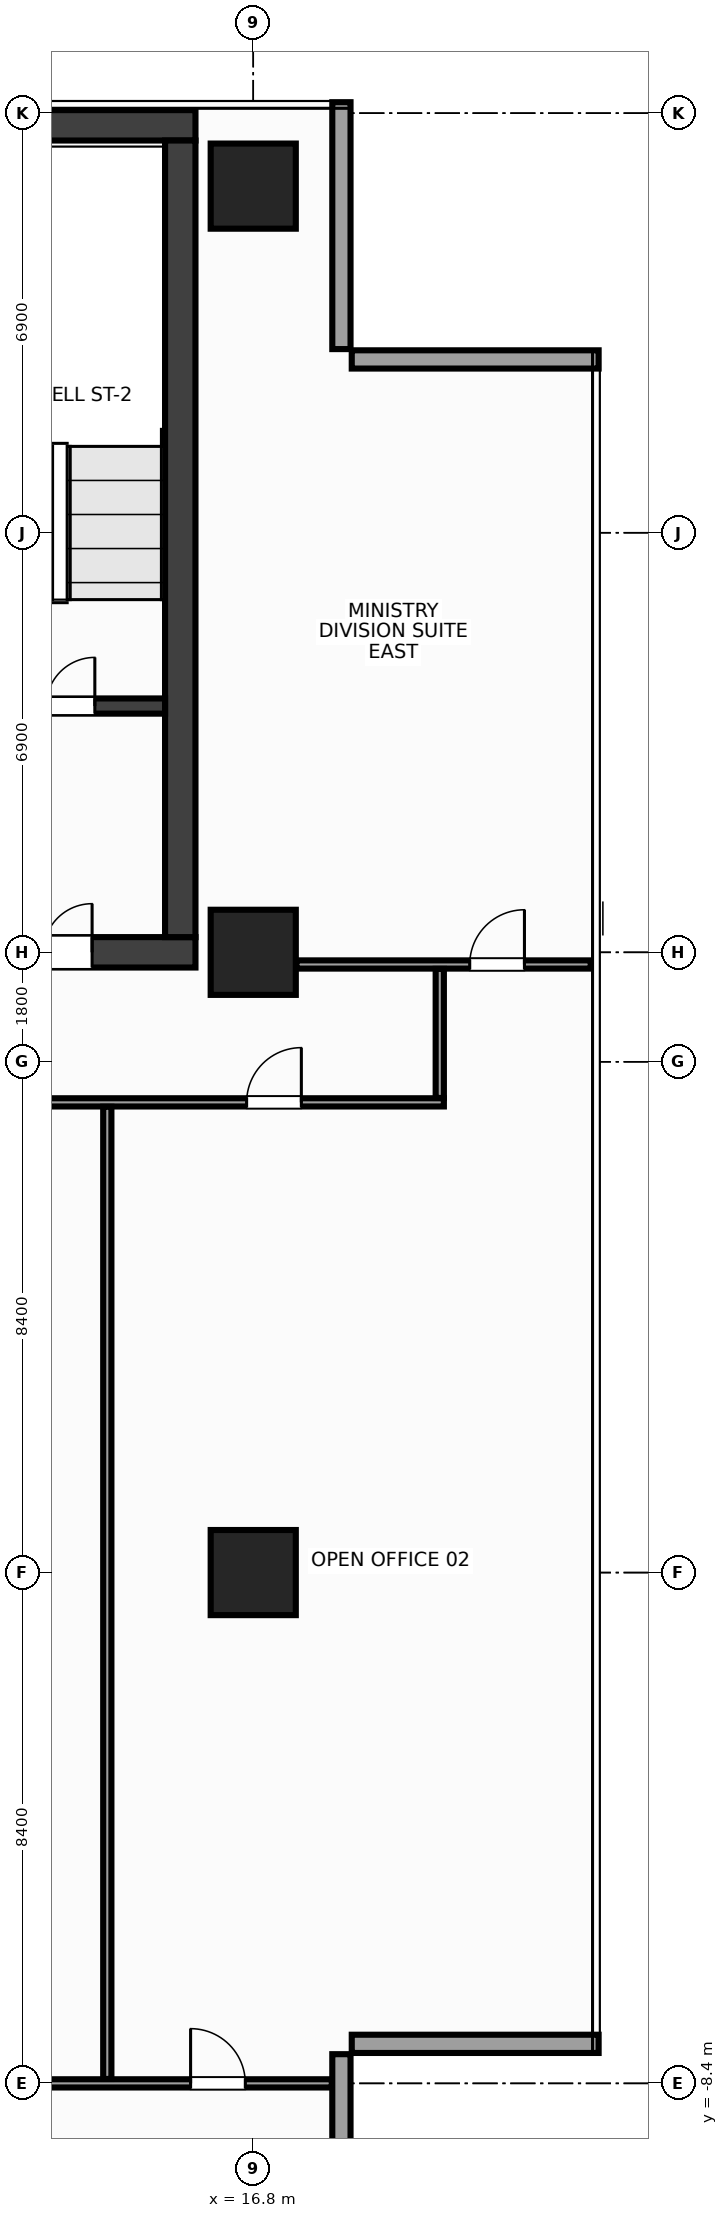
"""IFC4 building model, lengths in metres.
Left out: names, types, materials, properties, quantities, classifications, styles, units other than length and angle.
Written with IfcOpenShell. Run it as: python <this file> out.ifc"""

import sys

from ifc_helpers import new_model, si_unit, direction, frame, frame_2d, origin, origin_2d, place, context, subcontext, project, spatial, rectangle, extrude, source, transform, mapped, element, fill, save


model = new_model("IFC4")
c1 = context("Model", 3, precision=1e-05, world=origin(), true_north=direction((0.0, 1.0)))
c2 = subcontext(c1, "Body", "Model", "MODEL_VIEW")
j1 = project(units=[si_unit("LENGTHUNIT", "METRE"), si_unit("PLANEANGLEUNIT", "RADIAN")], contexts=[c1])
p1 = place(None, origin())
s1 = spatial("IfcSite", under=j1, at=p1, CompositionType="ELEMENT")
p2 = place(p1, origin())
s2 = spatial("IfcBuilding", under=s1, at=p2, CompositionType="ELEMENT")
p3 = place(p2, frame((0.0, 0.0, 232.4)))
s3 = spatial("IfcBuildingStorey", under=s2, at=p3, CompositionType="ELEMENT", Elevation=232.4)
m1 = source(origin(), c2, "Body", "SweptSolid", [
    extrude(rectangle(XDim=31.7, YDim=0.5, at=frame_2d((15.85, 0.0))), origin(), (0.0, 0.0, 1.0), 3.6),
])
p4 = place(p3, frame((-15.85, 23.8, 0.0), z_axis=(0.0, 0.0, 1.0), x_axis=(1.0, 0.0, 0.0)))
e1 = element("IfcWall", 1, at=p4, inside=s3, PredefinedType="SHEAR", context=c2, shape_type="MappedRepresentation", body=[
    mapped(m1, transform((0.0, 0.0, 0.0), x_axis=(1.0, 0.0, 0.0), y_axis=(0.0, 1.0, 0.0), z_axis=(0.0, 0.0, 1.0), scale=1.0)),
])
p5 = place(p3, frame((-15.85, 10.2, 0.0), z_axis=(0.0, 0.0, 1.0), x_axis=(1.0, 0.0, 0.0)))
e2 = element("IfcWall", 2, at=p5, inside=s3, PredefinedType="SHEAR", context=c2, shape_type="MappedRepresentation", body=[
    mapped(m1, transform((0.0, 0.0, 0.0), x_axis=(1.0, 0.0, 0.0), y_axis=(0.0, 1.0, 0.0), z_axis=(0.0, 0.0, 1.0), scale=1.0)),
])
p6 = place(p5, frame((1.7, 0.0, 0.0)))
e3 = element("IfcOpeningElement", 3, at=p6, cuts=e2, PredefinedType="OPENING", context=c2, shape_type="SweptSolid", body=[
    extrude(rectangle(XDim=1.6, YDim=2.15, at=frame_2d((0.8, 1.075))), frame((0.0, 0.262, 0.0), z_axis=(0.0, -1.0, 0.0), x_axis=(1.0, 0.0, 0.0)), (0.0, 0.0, 1.0), 0.524),
])
p7 = place(p5, frame((28.4, 0.0, 0.0)))
e4 = element("IfcOpeningElement", 4, at=p7, cuts=e2, PredefinedType="OPENING", context=c2, shape_type="SweptSolid", body=[
    extrude(rectangle(XDim=1.6, YDim=2.15, at=frame_2d((0.8, 1.075))), frame((0.0, 0.262, 0.0), z_axis=(0.0, -1.0, 0.0), x_axis=(1.0, 0.0, 0.0)), (0.0, 0.0, 1.0), 0.524),
])
p8 = place(p5, frame((15.1, 0.0, 0.0)))
e5 = element("IfcOpeningElement", 5, at=p8, cuts=e2, PredefinedType="OPENING", context=c2, shape_type="SweptSolid", body=[
    extrude(rectangle(XDim=1.5, YDim=2.2, at=frame_2d((0.75, 1.1))), frame((0.0, 0.262, 0.0), z_axis=(0.0, -1.0, 0.0), x_axis=(1.0, 0.0, 0.0)), (0.0, 0.0, 1.0), 0.524),
])
m2 = source(origin(), c2, "Body", "SweptSolid", [
    extrude(rectangle(XDim=13.1, YDim=0.5, at=frame_2d((6.55, 0.0))), origin(), (0.0, 0.0, 1.0), 3.6),
])
p9 = place(p3, frame((15.6, 10.45, 0.0), z_axis=(0.0, 0.0, 1.0), x_axis=(0.0, 1.0, 0.0)))
e6 = element("IfcWall", 6, at=p9, inside=s3, PredefinedType="SHEAR", context=c2, shape_type="MappedRepresentation", body=[
    mapped(m2, transform((0.0, 0.0, 0.0), x_axis=(1.0, 0.0, 0.0), y_axis=(0.0, 1.0, 0.0), z_axis=(0.0, 0.0, 1.0), scale=1.0)),
])
m3 = source(origin(), c2, "Body", "SweptSolid", [
    extrude(rectangle(XDim=3.705, YDim=0.25, at=frame_2d((1.853, 0.0))), origin(), (0.0, 0.0, 1.0), 3.6),
])
p10 = place(p3, frame((11.645, 14.25, 0.0), z_axis=(0.0, 0.0, 1.0), x_axis=(1.0, 0.0, 0.0)))
e7 = element("IfcWall", 7, at=p10, inside=s3, PredefinedType="SHEAR", context=c2, shape_type="MappedRepresentation", body=[
    mapped(m3, transform((0.0, 0.0, 0.0), x_axis=(1.0, 0.0, 0.0), y_axis=(0.0, 1.0, 0.0), z_axis=(0.0, 0.0, 1.0), scale=1.0)),
])
p11 = place(p10, frame((0.95, 0.0, 0.0)))
e8 = element("IfcOpeningElement", 8, at=p11, cuts=e7, PredefinedType="OPENING", context=c2, shape_type="SweptSolid", body=[
    extrude(rectangle(XDim=1.6, YDim=2.15, at=frame_2d((0.8, 1.075))), frame((0.0, 0.137, 0.0), z_axis=(0.0, -1.0, 0.0), x_axis=(1.0, 0.0, 0.0)), (0.0, 0.0, 1.0), 0.274),
])
m4 = source(origin(), c2, "Body", "SweptSolid", [
    extrude(rectangle(XDim=1.4, YDim=1.4, at=origin_2d()), origin(), (0.0, 0.0, 1.0), 3.6),
])
for number, where, z_axis, x_axis in (
    (9, (16.8, 0.0, 0.0), (0.0, 0.0, 1.0), (1.0, 0.0, 0.0)),
    (10, (16.8, 10.2, 0.0), (0.0, 0.0, 1.0), (1.0, 0.0, 0.0)),
    (11, (16.8, 22.8, 0.0), (0.0, 0.0, 1.0), (1.0, 0.0, 0.0)),
):
    element("IfcColumn", number, at=place(p3, frame(where, z_axis=z_axis, x_axis=x_axis)), inside=s3, PredefinedType="COLUMN", context=c2, shape_type="MappedRepresentation", body=[
        mapped(m4, transform((0.0, 0.0, 0.0), x_axis=(1.0, 0.0, 0.0), y_axis=(0.0, 1.0, 0.0), z_axis=(0.0, 0.0, 1.0), scale=1.0)),
    ])
m5 = source(origin(), c2, "Body", "SweptSolid", [
    extrude(rectangle(XDim=4.06, YDim=0.3, at=frame_2d((2.03, 0.0))), origin(), (0.0, 0.0, 1.0), 2.75),
])
for number, where, z_axis, x_axis in (
    (12, (18.25, -11.98, 0.0), (0.0, 0.0, 1.0), (0.0, 1.0, 0.0)),
    (13, (18.42, -7.75, 0.0), (0.0, 0.0, 1.0), (1.0, 0.0, 0.0)),
    (14, (22.48, 19.95, 0.0), (0.0, 0.0, 1.0), (-1.0, 0.0, 0.0)),
):
    element("IfcWall", number, at=place(p3, frame(where, z_axis=z_axis, x_axis=x_axis)), inside=s3, PredefinedType="STANDARD", context=c2, shape_type="MappedRepresentation", body=[
        mapped(m5, transform((0.0, 0.0, 0.0), x_axis=(1.0, 0.0, 0.0), y_axis=(0.0, 1.0, 0.0), z_axis=(0.0, 0.0, 1.0), scale=1.0)),
    ])
m6 = source(origin(), c2, "Body", "SweptSolid", [
    extrude(rectangle(XDim=4.06, YDim=0.3, at=frame_2d((2.03, 0.0))), origin(), (0.0, 0.0, 1.0), 2.75),
])
p12 = place(p3, frame((18.25, 20.12, 0.0), z_axis=(0.0, 0.0, 1.0), x_axis=(0.0, 1.0, 0.0)))
e15 = element("IfcWall", 15, at=p12, inside=s3, PredefinedType="STANDARD", context=c2, shape_type="MappedRepresentation", body=[
    mapped(m6, transform((0.0, 0.0, 0.0), x_axis=(1.0, 0.0, 0.0), y_axis=(0.0, 1.0, 0.0), z_axis=(0.0, 0.0, 1.0), scale=1.0)),
])
m7 = source(origin(), c2, "Body", "SweptSolid", [
    extrude(rectangle(XDim=4.84, YDim=0.135, at=frame_2d((2.42, 0.0))), origin(), (0.0, 0.0, 1.0), 3.37),
])
p13 = place(p3, frame((17.51, 10.0, 0.0), z_axis=(0.0, 0.0, 1.0), x_axis=(1.0, 0.0, 0.0)))
e16 = element("IfcWall", 16, at=p13, inside=s3, PredefinedType="PARTITIONING", context=c2, shape_type="MappedRepresentation", body=[
    mapped(m7, transform((0.0, 0.0, 0.0), x_axis=(1.0, 0.0, 0.0), y_axis=(0.0, 1.0, 0.0), z_axis=(0.0, 0.0, 1.0), scale=1.0)),
])
p14 = place(p13, frame((2.85, 0.0, 0.0)))
e17 = element("IfcOpeningElement", 17, at=p14, cuts=e16, PredefinedType="OPENING", context=c2, shape_type="SweptSolid", body=[
    extrude(rectangle(XDim=0.9, YDim=2.15, at=frame_2d((0.45, 1.075))), frame((0.0, 0.08, 0.0), z_axis=(0.0, -1.0, 0.0), x_axis=(1.0, 0.0, 0.0)), (0.0, 0.0, 1.0), 0.159),
])
m8 = source(origin(), c2, "Body", "SweptSolid", [
    extrude(rectangle(XDim=21.9, YDim=0.135, at=frame_2d((10.95, 0.0))), origin(), (0.0, 0.0, 1.0), 2.755),
])
p15 = place(p3, frame((-1.965, 7.732, 0.0), z_axis=(0.0, 0.0, 1.0), x_axis=(1.0, 0.0, 0.0)))
e18 = element("IfcWall", 18, at=p15, inside=s3, PredefinedType="PARTITIONING", context=c2, shape_type="MappedRepresentation", body=[
    mapped(m8, transform((0.0, 0.0, 0.0), x_axis=(1.0, 0.0, 0.0), y_axis=(0.0, 1.0, 0.0), z_axis=(0.0, 0.0, 1.0), scale=1.0)),
])
p16 = place(p15, frame((18.656, 0.0, 0.0)))
e19 = element("IfcOpeningElement", 19, at=p16, cuts=e18, PredefinedType="OPENING", context=c2, shape_type="SweptSolid", body=[
    extrude(rectangle(XDim=0.9, YDim=2.15, at=frame_2d((0.45, 1.075))), frame((0.0, 0.08, 0.0), z_axis=(0.0, -1.0, 0.0), x_axis=(1.0, 0.0, 0.0)), (0.0, 0.0, 1.0), 0.159),
])
p17 = place(p15, frame((8.115, 0.0, 0.0)))
e20 = element("IfcOpeningElement", 20, at=p17, cuts=e18, PredefinedType="OPENING", context=c2, shape_type="SweptSolid", body=[
    extrude(rectangle(XDim=0.9, YDim=2.15, at=frame_2d((0.45, 1.075))), frame((0.0, 0.08, 0.0), z_axis=(0.0, -1.0, 0.0), x_axis=(1.0, 0.0, 0.0)), (0.0, 0.0, 1.0), 0.159),
])
m9 = source(origin(), c2, "Body", "SweptSolid", [
    extrude(rectangle(XDim=2.123, YDim=0.135, at=frame_2d((1.061, 0.0))), origin(), (0.0, 0.0, 1.0), 3.37),
])
p18 = place(p3, frame((19.867, 7.805, 0.0), z_axis=(0.0, 0.0, 1.0), x_axis=(0.0, 1.0, 0.0)))
e21 = element("IfcWall", 21, at=p18, inside=s3, PredefinedType="PARTITIONING", context=c2, shape_type="MappedRepresentation", body=[
    mapped(m9, transform((0.0, 0.0, 0.0), x_axis=(1.0, 0.0, 0.0), y_axis=(0.0, 1.0, 0.0), z_axis=(0.0, 0.0, 1.0), scale=1.0)),
])
m10 = source(origin(), c2, "Body", "SweptSolid", [
    extrude(rectangle(XDim=36.184, YDim=0.135, at=frame_2d((18.092, 0.0))), origin(), (0.0, 0.0, 1.0), 2.755),
])
p19 = place(p3, frame((-18.092, -8.4, 0.0), z_axis=(0.0, 0.0, 1.0), x_axis=(1.0, 0.0, 0.0)))
e22 = element("IfcWall", 22, at=p19, inside=s3, PredefinedType="PARTITIONING", context=c2, shape_type="MappedRepresentation", body=[
    mapped(m10, transform((0.0, 0.0, 0.0), x_axis=(1.0, 0.0, 0.0), y_axis=(0.0, 1.0, 0.0), z_axis=(0.0, 0.0, 1.0), scale=1.0)),
])
p20 = place(p19, frame((1.022, 0.0, 0.0)))
e23 = element("IfcOpeningElement", 23, at=p20, cuts=e22, PredefinedType="OPENING", context=c2, shape_type="SweptSolid", body=[
    extrude(rectangle(XDim=0.9, YDim=2.15, at=frame_2d((0.45, 1.075))), frame((0.0, 0.08, 0.0), z_axis=(0.0, -1.0, 0.0), x_axis=(1.0, 0.0, 0.0)), (0.0, 0.0, 1.0), 0.159),
])
p21 = place(p19, frame((9.142, 0.0, 0.0)))
e24 = element("IfcOpeningElement", 24, at=p21, cuts=e22, PredefinedType="OPENING", context=c2, shape_type="SweptSolid", body=[
    extrude(rectangle(XDim=0.9, YDim=2.15, at=frame_2d((0.45, 1.075))), frame((0.0, 0.08, 0.0), z_axis=(0.0, -1.0, 0.0), x_axis=(1.0, 0.0, 0.0)), (0.0, 0.0, 1.0), 0.159),
])
p22 = place(p19, frame((33.862, 0.0, 0.0)))
e25 = element("IfcOpeningElement", 25, at=p22, cuts=e22, PredefinedType="OPENING", context=c2, shape_type="SweptSolid", body=[
    extrude(rectangle(XDim=0.9, YDim=2.15, at=frame_2d((0.45, 1.075))), frame((0.0, 0.08, 0.0), z_axis=(0.0, -1.0, 0.0), x_axis=(1.0, 0.0, 0.0)), (0.0, 0.0, 1.0), 0.159),
])
p23 = place(p19, frame((18.942, 0.0, 0.0)))
e26 = element("IfcOpeningElement", 26, at=p23, cuts=e22, PredefinedType="OPENING", context=c2, shape_type="SweptSolid", body=[
    extrude(rectangle(XDim=0.9, YDim=2.15, at=frame_2d((0.45, 1.075))), frame((0.0, 0.08, 0.0), z_axis=(0.0, -1.0, 0.0), x_axis=(1.0, 0.0, 0.0)), (0.0, 0.0, 1.0), 0.159),
])
p24 = place(p19, frame((25.542, 0.0, 0.0)))
e27 = element("IfcOpeningElement", 27, at=p24, cuts=e22, PredefinedType="OPENING", context=c2, shape_type="SweptSolid", body=[
    extrude(rectangle(XDim=0.9, YDim=2.15, at=frame_2d((0.45, 1.075))), frame((0.0, 0.08, 0.0), z_axis=(0.0, -1.0, 0.0), x_axis=(1.0, 0.0, 0.0)), (0.0, 0.0, 1.0), 0.159),
])
m11 = source(origin(), c2, "Body", "SweptSolid", [
    extrude(rectangle(XDim=15.987, YDim=0.135, at=frame_2d((7.994, 0.0))), origin(), (0.0, 0.0, 1.0), 2.655),
])
p25 = place(p3, frame((14.4, -8.327, 0.0), z_axis=(0.0, 0.0, 1.0), x_axis=(0.0, 1.0, 0.0)))
e28 = element("IfcWall", 28, at=p25, inside=s3, PredefinedType="PARTITIONING", context=c2, shape_type="MappedRepresentation", body=[
    mapped(m11, transform((0.0, 0.0, 0.0), x_axis=(1.0, 0.0, 0.0), y_axis=(0.0, 1.0, 0.0), z_axis=(0.0, 0.0, 1.0), scale=1.0)),
])
m12 = source(origin(), c2, "Body", "SweptSolid", [
    extrude(rectangle(XDim=1.6, YDim=2.15, at=frame_2d((0.8, 1.075))), frame((0.0, 0.025, 0.0), z_axis=(0.0, -1.0, 0.0), x_axis=(1.0, 0.0, 0.0)), (0.0, 0.0, 1.0), 0.05),
])
p26 = place(p11, origin())
e29 = element("IfcDoor", 29, at=p26, inside=s3, OperationType="DOUBLE_DOOR_SINGLE_SWING", PredefinedType="DOOR", context=c2, shape_type="MappedRepresentation", body=[
    mapped(m12, transform((0.0, 0.0, 0.0), x_axis=(1.0, 0.0, 0.0), y_axis=(0.0, 1.0, 0.0), z_axis=(0.0, 0.0, 1.0), scale=1.0)),
])
fill(e8, e29)
p27 = place(p7, origin())
e30 = element("IfcDoor", 30, at=p27, inside=s3, OperationType="DOUBLE_DOOR_SINGLE_SWING", PredefinedType="DOOR", context=c2, shape_type="MappedRepresentation", body=[
    mapped(m12, transform((0.0, 0.0, 0.0), x_axis=(1.0, 0.0, 0.0), y_axis=(0.0, 1.0, 0.0), z_axis=(0.0, 0.0, 1.0), scale=1.0)),
])
fill(e4, e30)
m13 = source(origin(), c2, "Body", "SweptSolid", [
    extrude(rectangle(XDim=0.9, YDim=2.15, at=frame_2d((0.45, 1.075))), frame((0.0, 0.025, 0.0), z_axis=(0.0, -1.0, 0.0), x_axis=(1.0, 0.0, 0.0)), (0.0, 0.0, 1.0), 0.05),
])
p28 = place(p16, origin())
e31 = element("IfcDoor", 31, at=p28, inside=s3, OperationType="SINGLE_SWING_RIGHT", PredefinedType="DOOR", context=c2, shape_type="MappedRepresentation", body=[
    mapped(m13, transform((0.0, 0.0, 0.0), x_axis=(1.0, 0.0, 0.0), y_axis=(0.0, 1.0, 0.0), z_axis=(0.0, 0.0, 1.0), scale=1.0)),
])
fill(e19, e31)
p29 = place(p14, origin())
e32 = element("IfcDoor", 32, at=p29, inside=s3, OperationType="SINGLE_SWING_RIGHT", PredefinedType="DOOR", context=c2, shape_type="MappedRepresentation", body=[
    mapped(m13, transform((0.0, 0.0, 0.0), x_axis=(1.0, 0.0, 0.0), y_axis=(0.0, 1.0, 0.0), z_axis=(0.0, 0.0, 1.0), scale=1.0)),
])
fill(e17, e32)
p30 = place(p22, origin())
e33 = element("IfcDoor", 33, at=p30, inside=s3, OperationType="SINGLE_SWING_LEFT", PredefinedType="DOOR", context=c2, shape_type="MappedRepresentation", body=[
    mapped(m13, transform((0.0, 0.0, 0.0), x_axis=(1.0, 0.0, 0.0), y_axis=(0.0, 1.0, 0.0), z_axis=(0.0, 0.0, 1.0), scale=1.0)),
])
fill(e25, e33)
save(model, sys.argv[1])
